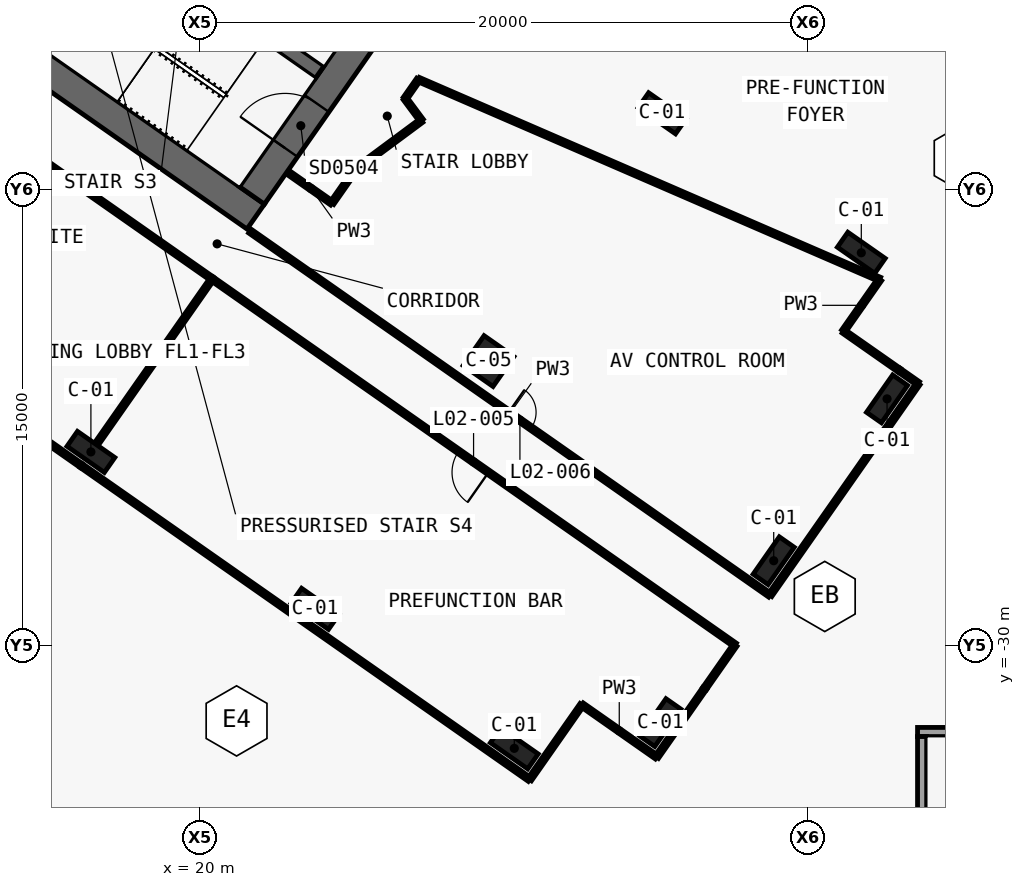
"""IFC4 building model, lengths in metres.
Left out: names, types, materials, properties, quantities, classifications, styles, units other than length and angle.
Written with IfcOpenShell. Run it as: python <this file> out.ifc"""

import sys

from ifc_helpers import new_model, si_unit, direction, frame, frame_2d, origin, origin_2d, place, context, subcontext, project, spatial, polyline, rectangle, outline, extrude, element, fill, save


model = new_model("IFC4")
c1 = context("Model", 3, precision=1e-05, world=origin(), true_north=direction((0.0, 1.0)))
c2 = subcontext(c1, "Body", "Model", "MODEL_VIEW")
j1 = project(units=[si_unit("LENGTHUNIT", "METRE"), si_unit("PLANEANGLEUNIT", "RADIAN")], contexts=[c1])
p1 = place(None, origin())
s1 = spatial("IfcSite", under=j1, at=p1, CompositionType="ELEMENT")
p2 = place(p1, origin())
s2 = spatial("IfcBuilding", under=s1, at=p2, CompositionType="ELEMENT")
p3 = place(p2, frame((0.0, 0.0, 18.0)))
s3 = spatial("IfcBuildingStorey", under=s2, at=p3, CompositionType="ELEMENT", Elevation=18.0)
p4 = place(p3, frame((-0.037, -0.585, 0.0), z_axis=(0.0, 0.0, 1.0), x_axis=(0.819157152511, -0.573569140985, 0.0)))
e1 = element("IfcWall", 1, at=p4, inside=s3, PredefinedType="SHEAR", context=c2, shape_type="SweptSolid", body=[
    extrude(outline(polyline([(26.695, 0.5), (0.0, 0.5), (0.7, -0.5), (26.695, -0.5), (26.695, 0.5)])), origin(), (0.0, 0.0, 1.0), 8.0),
])
p5 = place(p4, frame((6.695, 0.0, 0.0)))
e2 = element("IfcOpeningElement", 2, at=p5, cuts=e1, PredefinedType="OPENING", context=c2, shape_type="SweptSolid", body=[
    extrude(rectangle(XDim=1.5, YDim=2.1, at=frame_2d((0.75, 1.05))), frame((0.0, 0.51, 0.0), z_axis=(0.0, -1.0, 0.0), x_axis=(1.0, 0.0, 0.0)), (0.0, 0.0, 1.0), 1.02),
])
p6 = place(p4, frame((12.445, 0.0, 0.0)))
e3 = element("IfcOpeningElement", 3, at=p6, cuts=e1, PredefinedType="OPENING", context=c2, shape_type="SweptSolid", body=[
    extrude(rectangle(XDim=1.5, YDim=2.1, at=frame_2d((0.75, 1.05))), frame((0.0, 0.51, 0.0), z_axis=(0.0, -1.0, 0.0), x_axis=(1.0, 0.0, 0.0)), (0.0, 0.0, 1.0), 1.02),
])
p7 = place(p3, frame((21.708, -15.2, 0.0), z_axis=(0.0, 0.0, 1.0), x_axis=(0.573576324356, 0.819152122709, 0.0)))
e4 = element("IfcWall", 4, at=p7, inside=s3, PredefinedType="SHEAR", context=c2, shape_type="SweptSolid", body=[
    extrude(outline(polyline([(9.2, 0.5), (0.0, 0.5), (0.0, -0.5), (9.2, -0.5), (9.2, 0.5)])), origin(), (0.0, 0.0, 1.0), 8.0),
])
p8 = place(p7, frame((6.1, 0.0, 0.0)))
e5 = element("IfcOpeningElement", 5, at=p8, cuts=e4, PredefinedType="OPENING", context=c2, shape_type="SweptSolid", body=[
    extrude(rectangle(XDim=1.8, YDim=2.1, at=frame_2d((0.9, 1.05))), frame((0.0, 0.51, 0.0), z_axis=(0.0, -1.0, 0.0), x_axis=(1.0, 0.0, 0.0)), (0.0, 0.0, 1.0), 1.02),
])
p9 = place(p7, frame((1.9, 0.0, 0.0)))
e6 = element("IfcOpeningElement", 6, at=p9, cuts=e4, PredefinedType="OPENING", context=c2, shape_type="SweptSolid", body=[
    extrude(rectangle(XDim=1.8, YDim=2.1, at=frame_2d((0.9, 1.05))), frame((0.0, 0.51, 0.0), z_axis=(0.0, -1.0, 0.0), x_axis=(1.0, 0.0, 0.0)), (0.0, 0.0, 1.0), 1.02),
])
p10 = place(p3, frame((2.638, 3.768, 0.0), z_axis=(0.0, 0.0, 1.0), x_axis=(0.819148977158, -0.573580816643, 0.0)))
e7 = element("IfcWall", 7, at=p10, inside=s3, PredefinedType="SHEAR", context=c2, shape_type="SweptSolid", body=[
    extrude(outline(polyline([(0.0, 0.25), (0.0, -0.25), (26.0, -0.25), (26.0, 0.25), (0.0, 0.25)])), origin(), (0.0, 0.0, 1.0), 8.0),
])
p11 = place(p10, frame((9.637, 0.0, 0.0)))
e8 = element("IfcOpeningElement", 8, at=p11, cuts=e7, PredefinedType="OPENING", context=c2, shape_type="SweptSolid", body=[
    extrude(rectangle(XDim=1.2, YDim=2.1, at=frame_2d((0.6, 1.05))), frame((0.0, 0.26, 0.0), z_axis=(0.0, -1.0, 0.0), x_axis=(1.0, 0.0, 0.0)), (0.0, 0.0, 1.0), 0.52),
])
p12 = place(p10, frame((11.812, 0.0, 0.0)))
e9 = element("IfcOpeningElement", 9, at=p12, cuts=e7, PredefinedType="OPENING", context=c2, shape_type="SweptSolid", body=[
    extrude(rectangle(XDim=1.2, YDim=2.1, at=frame_2d((0.6, 1.05))), frame((0.0, 0.26, 0.0), z_axis=(0.0, -1.0, 0.0), x_axis=(1.0, 0.0, 0.0)), (0.0, 0.0, 1.0), 0.52),
])
p13 = place(p10, frame((13.988, 0.0, 0.0)))
e10 = element("IfcOpeningElement", 10, at=p13, cuts=e7, PredefinedType="OPENING", context=c2, shape_type="SweptSolid", body=[
    extrude(rectangle(XDim=1.2, YDim=2.1, at=frame_2d((0.6, 1.05))), frame((0.0, 0.26, 0.0), z_axis=(0.0, -1.0, 0.0), x_axis=(1.0, 0.0, 0.0)), (0.0, 0.0, 1.0), 0.52),
])
p14 = place(p10, frame((16.262, 0.0, 0.0)))
e11 = element("IfcOpeningElement", 11, at=p14, cuts=e7, PredefinedType="OPENING", context=c2, shape_type="SweptSolid", body=[
    extrude(rectangle(XDim=1.0, YDim=2.1, at=frame_2d((0.5, 1.05))), frame((0.0, 0.26, 0.0), z_axis=(0.0, -1.0, 0.0), x_axis=(1.0, 0.0, 0.0)), (0.0, 0.0, 1.0), 0.52),
])
p15 = place(p3, frame((43.6, -32.85, 0.0), z_axis=(0.0, 0.0, 1.0), x_axis=(1.0, 0.0, 0.0)))
e12 = element("IfcWall", 12, at=p15, inside=s3, PredefinedType="SOLIDWALL", context=c2, shape_type="SweptSolid", body=[
    extrude(rectangle(XDim=5.8, YDim=0.3, at=frame_2d((2.9, 0.0))), origin(), (0.0, 0.0, 1.0), 8.0),
])
p16 = place(p3, frame((43.75, -43.0, 0.0), z_axis=(0.0, 0.0, 1.0), x_axis=(0.0, 1.0, 0.0)))
e13 = element("IfcWall", 13, at=p16, inside=s3, PredefinedType="SOLIDWALL", context=c2, shape_type="SweptSolid", body=[
    extrude(rectangle(XDim=10.0, YDim=0.3, at=frame_2d((5.0, 0.0))), origin(), (0.0, 0.0, 1.0), 8.0),
])
p17 = place(p16, frame((0.212, 0.0, 0.0)))
e14 = element("IfcOpeningElement", 14, at=p17, cuts=e13, PredefinedType="OPENING", context=c2, shape_type="SweptSolid", body=[
    extrude(rectangle(XDim=2.1, YDim=2.1, at=frame_2d((1.05, 1.05))), frame((0.0, 0.16, 0.0), z_axis=(0.0, -1.0, 0.0), x_axis=(1.0, 0.0, 0.0)), (0.0, 0.0, 1.0), 0.32),
])
for number, where, z_axis, x_axis in (
    (15, (16.41, -23.637, 0.0), (0.0, 0.0, 1.0), (0.819, -0.574, 0.0)),
    (16, (23.782, -28.799, 0.0), (0.0, 0.0, 1.0), (0.819, -0.574, 0.0)),
    (17, (30.336, -33.388, 0.0), (0.0, 0.0, 1.0), (0.819, -0.574, 0.0)),
    (18, (35.197, -12.498, 0.0), (0.0, 0.0, 1.0), (0.819, -0.574, 0.0)),
    (19, (41.75, -17.087, 0.0), (0.0, 0.0, 1.0), (0.819, -0.574, 0.0)),
    (20, (35.14, -32.541, 0.0), (0.0, 0.0, 1.0), (0.574, 0.819, 0.0)),
    (21, (38.869, -27.216, 0.0), (0.0, 0.0, 1.0), (0.574, 0.819, 0.0)),
    (22, (42.597, -21.892, 0.0), (0.0, 0.0, 1.0), (0.574, 0.819, 0.0)),
):
    element("IfcColumn", number, at=place(p3, frame(where, z_axis=z_axis, x_axis=x_axis)), inside=s3, PredefinedType="COLUMN", context=c2, shape_type="SweptSolid", body=[
        extrude(rectangle(XDim=1.5, YDim=0.6, at=origin_2d()), origin(), (0.0, 0.0, 1.0), 8.0),
    ])
p18 = place(p3, frame((29.49, -20.649, 0.0), z_axis=(0.0, 0.0, 1.0), x_axis=(0.819152044289, -0.573576436351, 0.0)))
e23 = element("IfcColumn", 23, at=p18, inside=s3, PredefinedType="COLUMN", context=c2, shape_type="SweptSolid", body=[
    extrude(rectangle(XDim=1.2, YDim=1.2, at=origin_2d()), origin(), (0.0, 0.0, 1.0), 8.0),
])
p19 = place(p3, frame((21.642, -16.375, 0.0), z_axis=(0.0, 0.0, 1.0), x_axis=(0.819148965066, -0.573580833911, 0.0)))
e24 = element("IfcWall", 24, at=p19, inside=s3, PredefinedType="PARTITIONING", context=c2, shape_type="SweptSolid", body=[
    extrude(rectangle(XDim=20.88, YDim=0.15, at=frame_2d((10.44, 0.0))), origin(), (0.0, 0.0, 1.0), 6.18),
])
p20 = place(p19, frame((10.39, 0.0, 0.0)))
e25 = element("IfcOpeningElement", 25, at=p20, cuts=e24, PredefinedType="OPENING", context=c2, shape_type="SweptSolid", body=[
    extrude(rectangle(XDim=0.9, YDim=2.1, at=frame_2d((0.45, 1.05))), frame((0.0, 0.085, 0.0), z_axis=(0.0, -1.0, 0.0), x_axis=(1.0, 0.0, 0.0)), (0.0, 0.0, 1.0), 0.17),
])
p21 = place(p3, frame((20.398, -17.945, 0.0), z_axis=(0.0, 0.0, 1.0), x_axis=(-0.819147172988, 0.573583393228, 0.0)))
e26 = element("IfcWall", 26, at=p21, inside=s3, PredefinedType="PARTITIONING", context=c2, shape_type="SweptSolid", body=[
    extrude(rectangle(XDim=18.002, YDim=0.15, at=frame_2d((9.001, 0.0))), origin(), (0.0, 0.0, 1.0), 6.18),
])
p22 = place(p21, frame((8.101, 0.0, 0.0)))
e27 = element("IfcOpeningElement", 27, at=p22, cuts=e26, PredefinedType="OPENING", context=c2, shape_type="SweptSolid", body=[
    extrude(rectangle(XDim=1.8, YDim=2.4, at=frame_2d((0.9, 1.2))), frame((0.0, 0.085, 0.0), z_axis=(0.0, -1.0, 0.0), x_axis=(1.0, 0.0, 0.0)), (0.0, 0.0, 1.0), 0.17),
])
p23 = place(p3, frame((37.599, -29.989, 0.0), z_axis=(0.0, 0.0, 1.0), x_axis=(-0.819154909514, 0.573572344364, 0.0)))
e28 = element("IfcWall", 28, at=p23, inside=s3, PredefinedType="PARTITIONING", context=c2, shape_type="SweptSolid", body=[
    extrude(rectangle(XDim=21.002, YDim=0.15, at=frame_2d((10.501, 0.0))), origin(), (0.0, 0.0, 1.0), 6.18),
])
p24 = place(p23, frame((9.901, 0.0, 0.0)))
e29 = element("IfcOpeningElement", 29, at=p24, cuts=e28, PredefinedType="OPENING", context=c2, shape_type="SweptSolid", body=[
    extrude(rectangle(XDim=1.2, YDim=2.4, at=frame_2d((0.6, 1.2))), frame((0.0, 0.085, 0.0), z_axis=(0.0, -1.0, 0.0), x_axis=(1.0, 0.0, 0.0)), (0.0, 0.0, 1.0), 0.17),
])
p25 = place(p3, frame((42.357, -17.962, 0.0), z_axis=(0.0, 0.0, 1.0), x_axis=(-0.573533201177, -0.819182316183, 0.0)))
e30 = element("IfcWall", 30, at=p25, inside=s3, PredefinedType="PARTITIONING", context=c2, shape_type="SweptSolid", body=[
    extrude(rectangle(XDim=2.081, YDim=0.15, at=frame_2d((1.041, 0.0))), origin(), (0.0, 0.0, 1.0), 6.38),
])
p26 = place(p3, frame((41.164, -19.667, 0.0), z_axis=(0.0, 0.0, 1.0), x_axis=(0.81912956014, -0.573608545704, 0.0)))
e31 = element("IfcWall", 31, at=p26, inside=s3, PredefinedType="PARTITIONING", context=c2, shape_type="SweptSolid", body=[
    extrude(rectangle(XDim=2.241, YDim=0.15, at=frame_2d((1.121, 0.0))), origin(), (0.0, 0.0, 1.0), 6.38),
])
p27 = place(p3, frame((42.998, -20.952, 0.0), z_axis=(0.0, 0.0, 1.0), x_axis=(0.819141432686, -0.573591590992, 0.0)))
e32 = element("IfcWall", 32, at=p27, inside=s3, PredefinedType="PARTITIONING", context=c2, shape_type="SweptSolid", body=[
    extrude(rectangle(XDim=0.76, YDim=0.15, at=frame_2d((0.38, 0.0))), origin(), (0.0, 0.0, 1.0), 7.6),
])
p28 = place(p3, frame((43.621, -21.388, 0.0), z_axis=(0.0, 0.0, 1.0), x_axis=(-0.57357799764, -0.819150951061, 0.0)))
e33 = element("IfcWall", 33, at=p28, inside=s3, PredefinedType="PARTITIONING", context=c2, shape_type="SweptSolid", body=[
    extrude(rectangle(XDim=8.5, YDim=0.15, at=frame_2d((4.25, 0.0))), origin(), (0.0, 0.0, 1.0), 7.6),
])
p29 = place(p3, frame((26.746, -12.014, 0.0), z_axis=(0.0, 0.0, 1.0), x_axis=(0.573761975376, 0.819022097146, 0.0)))
e34 = element("IfcWall", 34, at=p29, inside=s3, PredefinedType="PARTITIONING", context=c2, shape_type="SweptSolid", body=[
    extrude(rectangle(XDim=0.765, YDim=0.15, at=frame_2d((0.383, 0.0))), origin(), (0.0, 0.0, 1.0), 7.6),
])
p30 = place(p3, frame((27.185, -11.387, 0.0), z_axis=(0.0, 0.0, 1.0), x_axis=(0.917531384635, -0.397663372979, 0.0)))
e35 = element("IfcWall", 35, at=p30, inside=s3, PredefinedType="PARTITIONING", context=c2, shape_type="SweptSolid", body=[
    extrude(rectangle(XDim=16.536, YDim=0.15, at=frame_2d((8.268, 0.0))), origin(), (0.0, 0.0, 1.0), 6.18),
])
p31 = place(p3, frame((22.961, -14.49, 0.0), z_axis=(0.0, 0.0, 1.0), x_axis=(0.819109000826, -0.573637903879, 0.0)))
e36 = element("IfcWall", 36, at=p31, inside=s3, PredefinedType="PARTITIONING", context=c2, shape_type="SweptSolid", body=[
    extrude(rectangle(XDim=1.68, YDim=0.15, at=frame_2d((0.84, 0.0))), origin(), (0.0, 0.0, 1.0), 7.6),
])
p32 = place(p3, frame((24.337, -15.454, 0.0), z_axis=(0.0, 0.0, 1.0), x_axis=(0.573571252353, 0.819155674139, 0.0)))
e37 = element("IfcWall", 37, at=p32, inside=s3, PredefinedType="PARTITIONING", context=c2, shape_type="SweptSolid", body=[
    extrude(rectangle(XDim=1.354, YDim=0.15, at=frame_2d((0.677, 0.0))), origin(), (0.0, 0.0, 1.0), 7.6),
])
p33 = place(p3, frame((25.114, -14.345, 0.0), z_axis=(0.0, 0.0, 1.0), x_axis=(0.803211070557, 0.595694532571, 0.0)))
e38 = element("IfcWall", 38, at=p33, inside=s3, PredefinedType="PARTITIONING", context=c2, shape_type="SweptSolid", body=[
    extrude(rectangle(XDim=2.7, YDim=0.15, at=frame_2d((1.35, 0.0))), origin(), (0.0, 0.0, 1.0), 7.6),
])
p34 = place(p3, frame((27.282, -12.737, 0.0), z_axis=(0.0, 0.0, 1.0), x_axis=(-0.595869495235, 0.803081281471, 0.0)))
e39 = element("IfcWall", 39, at=p34, inside=s3, PredefinedType="PARTITIONING", context=c2, shape_type="SweptSolid", body=[
    extrude(rectangle(XDim=0.9, YDim=0.15, at=frame_2d((0.45, 0.0))), origin(), (0.0, 0.0, 1.0), 7.6),
])
p35 = place(p3, frame((20.396, -17.944, 0.0), z_axis=(0.0, 0.0, 1.0), x_axis=(-0.57359826181, -0.819136761505, 0.0)))
e40 = element("IfcWall", 40, at=p35, inside=s3, PredefinedType="PARTITIONING", context=c2, shape_type="SweptSolid", body=[
    extrude(rectangle(XDim=6.63, YDim=0.15, at=frame_2d((3.315, 0.0))), origin(), (0.0, 0.0, 1.0), 6.18),
])
p36 = place(p3, frame((16.094, -24.088, 0.0), z_axis=(0.0, 0.0, 1.0), x_axis=(-0.819155454297, 0.573571566324, 0.0)))
e41 = element("IfcWall", 41, at=p36, inside=s3, PredefinedType="PARTITIONING", context=c2, shape_type="SweptSolid", body=[
    extrude(rectangle(XDim=7.351, YDim=0.15, at=frame_2d((3.675, 0.0))), origin(), (0.0, 0.0, 1.0), 7.6),
])
p37 = place(p3, frame((32.56, -31.955, 0.0), z_axis=(0.0, 0.0, 1.0), x_axis=(-0.573560650686, -0.819163097304, 0.0)))
e42 = element("IfcWall", 42, at=p37, inside=s3, PredefinedType="PARTITIONING", context=c2, shape_type="SweptSolid", body=[
    extrude(rectangle(XDim=3.0, YDim=0.15, at=frame_2d((1.5, 0.0))), origin(), (0.0, 0.0, 1.0), 6.38),
])
p38 = place(p3, frame((30.839, -34.412, 0.0), z_axis=(0.0, 0.0, 1.0), x_axis=(-0.81915226268, 0.573576124456, 0.0)))
e43 = element("IfcWall", 43, at=p38, inside=s3, PredefinedType="PARTITIONING", context=c2, shape_type="SweptSolid", body=[
    extrude(rectangle(XDim=18.0, YDim=0.15, at=frame_2d((9.0, 0.0))), origin(), (0.0, 0.0, 1.0), 7.6),
])
p39 = place(p3, frame((36.599, -31.417, 0.0), z_axis=(0.0, 0.0, 1.0), x_axis=(-0.573557416232, -0.819165361991, 0.0)))
e44 = element("IfcWall", 44, at=p39, inside=s3, PredefinedType="PARTITIONING", context=c2, shape_type="SweptSolid", body=[
    extrude(rectangle(XDim=2.757, YDim=0.15, at=frame_2d((1.379, 0.0))), origin(), (0.0, 0.0, 1.0), 7.6),
])
p40 = place(p3, frame((35.018, -33.675, 0.0), z_axis=(0.0, 0.0, 1.0), x_axis=(-0.819163097304, 0.573560650686, 0.0)))
e45 = element("IfcWall", 45, at=p40, inside=s3, PredefinedType="PARTITIONING", context=c2, shape_type="SweptSolid", body=[
    extrude(rectangle(XDim=3.0, YDim=0.15, at=frame_2d((1.5, 0.0))), origin(), (0.0, 0.0, 1.0), 6.38),
])
p41 = place(p3, frame((37.599, -29.989, 0.0), z_axis=(0.0, 0.0, 1.0), x_axis=(-0.573575034625, -0.819153025786, 0.0)))
e46 = element("IfcWall", 46, at=p41, inside=s3, PredefinedType="PARTITIONING", context=c2, shape_type="SweptSolid", body=[
    extrude(rectangle(XDim=1.745, YDim=0.15, at=frame_2d((0.872, 0.0))), origin(), (0.0, 0.0, 1.0), 7.6),
])
p42 = place(p9, origin())
e47 = element("IfcDoor", 47, at=p42, inside=s3, OperationType="DOUBLE_DOOR_SINGLE_SWING", PredefinedType="DOOR", context=c2, shape_type="SweptSolid", body=[
    extrude(rectangle(XDim=1.8, YDim=2.1, at=frame_2d((0.9, 1.05))), frame((0.0, 0.025, 0.0), z_axis=(0.0, -1.0, 0.0), x_axis=(1.0, 0.0, 0.0)), (0.0, 0.0, 1.0), 0.05),
])
fill(e6, e47)
p43 = place(p24, origin())
e48 = element("IfcDoor", 48, at=p43, inside=s3, OperationType="DOUBLE_DOOR_SINGLE_SWING", PredefinedType="DOOR", context=c2, shape_type="SweptSolid", body=[
    extrude(rectangle(XDim=1.2, YDim=2.4, at=frame_2d((0.6, 1.2))), frame((0.0, 0.025, 0.0), z_axis=(0.0, -1.0, 0.0), x_axis=(1.0, 0.0, 0.0)), (0.0, 0.0, 1.0), 0.05),
])
fill(e29, e48)
p44 = place(p20, origin())
e49 = element("IfcDoor", 49, at=p44, inside=s3, OperationType="SINGLE_SWING_RIGHT", PredefinedType="DOOR", context=c2, shape_type="SweptSolid", body=[
    extrude(rectangle(XDim=0.9, YDim=2.1, at=frame_2d((0.45, 1.05))), frame((0.0, 0.025, 0.0), z_axis=(0.0, -1.0, 0.0), x_axis=(1.0, 0.0, 0.0)), (0.0, 0.0, 1.0), 0.05),
])
fill(e25, e49)
save(model, sys.argv[1])
